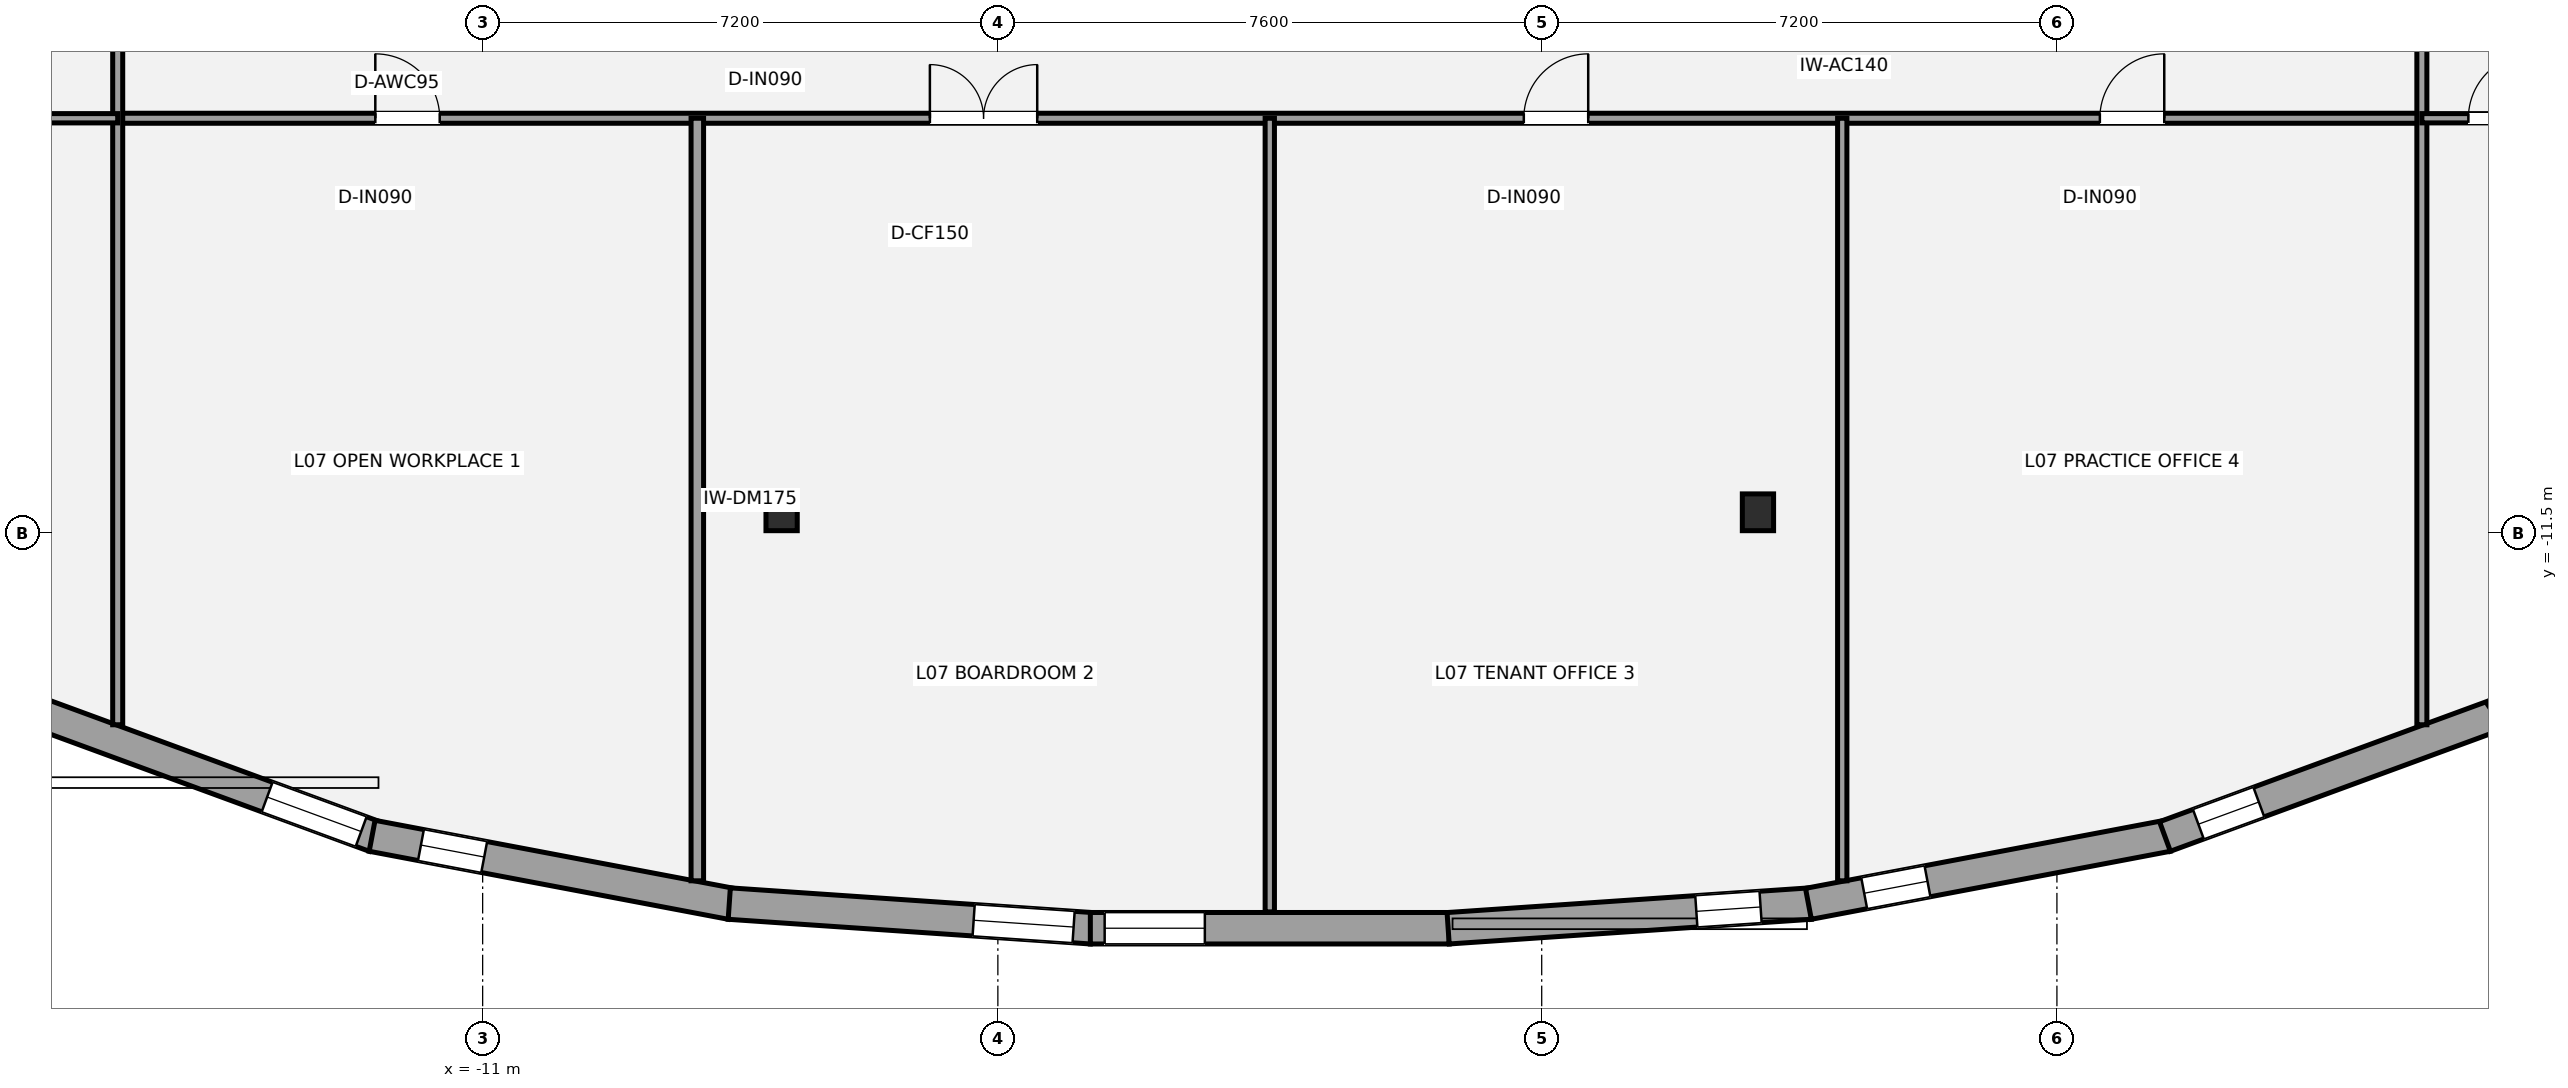
"""IFC4 building model, lengths in metres.
Left out: names, types, materials, properties, quantities, classifications, styles, units other than length and angle.
Written with IfcOpenShell. Run it as: python <this file> out.ifc"""

import sys

from ifc_helpers import new_model, si_unit, direction, frame, frame_2d, origin, origin_2d, place, context, subcontext, project, spatial, rectangle, i_section, extrude, element, fill, save


model = new_model("IFC4")
c1 = context("Model", 3, precision=1e-05, world=origin(), true_north=direction((0.0, 1.0)))
c2 = subcontext(c1, "Body", "Model", "MODEL_VIEW")
j1 = project(units=[si_unit("LENGTHUNIT", "METRE"), si_unit("PLANEANGLEUNIT", "RADIAN")], contexts=[c1])
p1 = place(None, origin())
s1 = spatial("IfcSite", under=j1, at=p1, CompositionType="ELEMENT")
p2 = place(p1, origin())
s2 = spatial("IfcBuilding", under=s1, at=p2, CompositionType="ELEMENT")
p3 = place(p2, frame((0.0, 0.0, 30.6)))
s3 = spatial("IfcBuildingStorey", under=s2, at=p3, CompositionType="ELEMENT", Elevation=30.6)
for number, where, z_axis, x_axis in (
    (1, (-6.822, -11.206, 0.0), (0.0, 0.0, 1.0), (1.0, 0.0, 0.0)),
    (2, (6.822, -11.206, 0.0), (0.0, 0.0, 1.0), (1.0, 0.0, 0.0)),
):
    element("IfcColumn", number, at=place(p3, frame(where, z_axis=z_axis, x_axis=x_axis)), inside=s3, PredefinedType="COLUMN", context=c2, shape_type="SweptSolid", body=[
        extrude(i_section(OverallWidth=0.437, OverallDepth=0.514, WebThickness=0.061, FlangeThickness=0.097, at=origin_2d()), origin(), (0.0, 0.0, 1.0), 3.6),
    ])
p4 = place(p3, frame((-17.125, -14.048, 0.0), z_axis=(0.0, 0.0, 1.0), x_axis=(-0.828051238664, 0.560652429003, 0.0)))
e3 = element("IfcWall", 3, at=p4, inside=s3, PredefinedType="STANDARD", context=c2, shape_type="SweptSolid", body=[
    extrude(rectangle(XDim=4.552, YDim=0.44, at=frame_2d((2.276, 0.0))), origin(), (0.0, 0.0, 1.0), 2.533),
])
p5 = place(p4, frame((3.156, 0.0, 0.58)))
e4 = element("IfcOpeningElement", 4, at=p5, cuts=e3, PredefinedType="OPENING", context=c2, shape_type="SweptSolid", body=[
    extrude(rectangle(XDim=0.9, YDim=1.35, at=frame_2d((0.45, 0.675))), frame((0.0, 0.23, 0.0), z_axis=(0.0, -1.0, 0.0), x_axis=(1.0, 0.0, 0.0)), (0.0, 0.0, 1.0), 0.46),
])
p6 = place(p3, frame((-12.51, -15.736, 0.0), z_axis=(0.0, 0.0, 1.0), x_axis=(-0.938710986641, 0.344705212552, 0.0)))
e5 = element("IfcWall", 5, at=p6, inside=s3, PredefinedType="STANDARD", context=c2, shape_type="SweptSolid", body=[
    extrude(rectangle(XDim=4.967, YDim=0.44, at=frame_2d((2.483, 0.0))), origin(), (0.0, 0.0, 1.0), 2.529),
])
p7 = place(p6, frame((0.2, 0.0, 0.45)))
e6 = element("IfcOpeningElement", 6, at=p7, cuts=e5, PredefinedType="OPENING", context=c2, shape_type="SweptSolid", body=[
    extrude(rectangle(XDim=1.4, YDim=1.55, at=frame_2d((0.7, 0.775))), frame((0.0, 0.23, 0.0), z_axis=(0.0, -1.0, 0.0), x_axis=(1.0, 0.0, 0.0)), (0.0, 0.0, 1.0), 0.46),
])
p8 = place(p3, frame((-7.528, -16.677, 0.0), z_axis=(0.0, 0.0, 1.0), x_axis=(-0.982516391845, 0.186176098776, 0.0)))
e7 = element("IfcWall", 7, at=p8, inside=s3, PredefinedType="STANDARD", context=c2, shape_type="SweptSolid", body=[
    extrude(rectangle(XDim=5.106, YDim=0.44, at=frame_2d((2.553, 0.0))), origin(), (0.0, 0.0, 1.0), 2.533),
])
p9 = place(p8, frame((3.512, 0.0, 0.58)))
e8 = element("IfcOpeningElement", 8, at=p9, cuts=e7, PredefinedType="OPENING", context=c2, shape_type="SweptSolid", body=[
    extrude(rectangle(XDim=0.9, YDim=1.35, at=frame_2d((0.45, 0.675))), frame((0.0, 0.23, 0.0), z_axis=(0.0, -1.0, 0.0), x_axis=(1.0, 0.0, 0.0)), (0.0, 0.0, 1.0), 0.46),
])
p10 = place(p3, frame((-2.492, -17.018, 0.0), z_axis=(0.0, 0.0, 1.0), x_axis=(-0.997688292846, 0.067956385408, 0.0)))
e9 = element("IfcWall", 9, at=p10, inside=s3, PredefinedType="STANDARD", context=c2, shape_type="SweptSolid", body=[
    extrude(rectangle(XDim=5.073, YDim=0.44, at=frame_2d((2.536, 0.0))), origin(), (0.0, 0.0, 1.0), 2.533),
])
p11 = place(p10, frame((0.25, 0.0, 0.45)))
e10 = element("IfcOpeningElement", 10, at=p11, cuts=e9, PredefinedType="OPENING", context=c2, shape_type="SweptSolid", body=[
    extrude(rectangle(XDim=1.4, YDim=1.55, at=frame_2d((0.7, 0.775))), frame((0.0, 0.23, 0.0), z_axis=(0.0, -1.0, 0.0), x_axis=(1.0, 0.0, 0.0)), (0.0, 0.0, 1.0), 0.46),
])
p12 = place(p3, frame((2.508, -17.018, 0.0), z_axis=(0.0, 0.0, 1.0), x_axis=(-1.0, 0.0, 0.0)))
e11 = element("IfcWall", 11, at=p12, inside=s3, PredefinedType="STANDARD", context=c2, shape_type="SweptSolid", body=[
    extrude(rectangle(XDim=5.015, YDim=0.44, at=frame_2d((2.508, 0.0))), origin(), (0.0, 0.0, 1.0), 2.533),
])
p13 = place(p12, frame((3.415, 0.0, 0.45)))
e12 = element("IfcOpeningElement", 12, at=p13, cuts=e11, PredefinedType="OPENING", context=c2, shape_type="SweptSolid", body=[
    extrude(rectangle(XDim=1.4, YDim=1.55, at=frame_2d((0.7, 0.775))), frame((0.0, 0.23, 0.0), z_axis=(0.0, -1.0, 0.0), x_axis=(1.0, 0.0, 0.0)), (0.0, 0.0, 1.0), 0.46),
])
p14 = place(p3, frame((7.553, -16.674, 0.0), z_axis=(0.0, 0.0, 1.0), x_axis=(-0.997688292846, -0.067956385408, 0.0)))
e13 = element("IfcWall", 13, at=p14, inside=s3, PredefinedType="STANDARD", context=c2, shape_type="SweptSolid", body=[
    extrude(rectangle(XDim=5.073, YDim=0.44, at=frame_2d((2.536, 0.0))), origin(), (0.0, 0.0, 1.0), 2.533),
])
p15 = place(p14, frame((0.696, 0.0, 0.58)))
e14 = element("IfcOpeningElement", 14, at=p15, cuts=e13, PredefinedType="OPENING", context=c2, shape_type="SweptSolid", body=[
    extrude(rectangle(XDim=0.9, YDim=1.35, at=frame_2d((0.45, 0.675))), frame((0.0, 0.23, 0.0), z_axis=(0.0, -1.0, 0.0), x_axis=(1.0, 0.0, 0.0)), (0.0, 0.0, 1.0), 0.46),
])
p16 = place(p3, frame((12.545, -15.726, 0.0), z_axis=(0.0, 0.0, 1.0), x_axis=(-0.982516391845, -0.186176098776, 0.0)))
e15 = element("IfcWall", 15, at=p16, inside=s3, PredefinedType="STANDARD", context=c2, shape_type="SweptSolid", body=[
    extrude(rectangle(XDim=5.106, YDim=0.44, at=frame_2d((2.553, 0.0))), origin(), (0.0, 0.0, 1.0), 2.533),
])
p17 = place(p16, frame((3.413, 0.0, 0.58)))
e16 = element("IfcOpeningElement", 16, at=p17, cuts=e15, PredefinedType="OPENING", context=c2, shape_type="SweptSolid", body=[
    extrude(rectangle(XDim=0.9, YDim=1.35, at=frame_2d((0.45, 0.675))), frame((0.0, 0.23, 0.0), z_axis=(0.0, -1.0, 0.0), x_axis=(1.0, 0.0, 0.0)), (0.0, 0.0, 1.0), 0.46),
])
p18 = place(p3, frame((17.173, -14.024, 0.0), z_axis=(0.0, 0.0, 1.0), x_axis=(-0.938710986641, -0.344705212552, 0.0)))
e17 = element("IfcWall", 17, at=p18, inside=s3, PredefinedType="STANDARD", context=c2, shape_type="SweptSolid", body=[
    extrude(rectangle(XDim=4.967, YDim=0.44, at=frame_2d((2.483, 0.0))), origin(), (0.0, 0.0, 1.0), 2.529),
])
p19 = place(p18, frame((3.57, 0.0, 0.58)))
e18 = element("IfcOpeningElement", 18, at=p19, cuts=e17, PredefinedType="OPENING", context=c2, shape_type="SweptSolid", body=[
    extrude(rectangle(XDim=0.9, YDim=1.35, at=frame_2d((0.45, 0.675))), frame((0.0, 0.23, 0.0), z_axis=(0.0, -1.0, 0.0), x_axis=(1.0, 0.0, 0.0)), (0.0, 0.0, 1.0), 0.46),
])
p20 = place(p3, frame((20.894, -11.496, 0.0), z_axis=(0.0, 0.0, 1.0), x_axis=(-0.828051238664, -0.560652429003, 0.0)))
e19 = element("IfcWall", 19, at=p20, inside=s3, PredefinedType="STANDARD", context=c2, shape_type="SweptSolid", body=[
    extrude(rectangle(XDim=4.552, YDim=0.44, at=frame_2d((2.276, 0.0))), origin(), (0.0, 0.0, 1.0), 2.533),
])
p21 = place(p20, frame((3.107, 0.0, 0.58)))
e20 = element("IfcOpeningElement", 20, at=p21, cuts=e19, PredefinedType="OPENING", context=c2, shape_type="SweptSolid", body=[
    extrude(rectangle(XDim=0.9, YDim=1.35, at=frame_2d((0.45, 0.675))), frame((0.0, 0.23, 0.0), z_axis=(0.0, -1.0, 0.0), x_axis=(1.0, 0.0, 0.0)), (0.0, 0.0, 1.0), 0.46),
])
p22 = place(p3, frame((-16.1, -5.7, 0.0), z_axis=(0.0, 0.0, 1.0), x_axis=(1.0, 0.0, 0.0)))
e21 = element("IfcWall", 21, at=p22, inside=s3, PredefinedType="PARTITIONING", context=c2, shape_type="SweptSolid", body=[
    extrude(rectangle(XDim=32.2, YDim=0.14, at=frame_2d((16.1, 0.0))), origin(), (0.0, 0.0, 1.0), 2.853),
])
p23 = place(p22, frame((3.6, 0.0, 0.0)))
e22 = element("IfcOpeningElement", 22, at=p23, cuts=e21, PredefinedType="OPENING", context=c2, shape_type="SweptSolid", body=[
    extrude(rectangle(XDim=0.9, YDim=2.1, at=frame_2d((0.45, 1.05))), frame((0.0, 0.08, 0.0), z_axis=(0.0, -1.0, 0.0), x_axis=(1.0, 0.0, 0.0)), (0.0, 0.0, 1.0), 0.16),
])
p24 = place(p22, frame((11.35, 0.0, 0.0)))
e23 = element("IfcOpeningElement", 23, at=p24, cuts=e21, PredefinedType="OPENING", context=c2, shape_type="SweptSolid", body=[
    extrude(rectangle(XDim=1.5, YDim=2.15, at=frame_2d((0.75, 1.075))), frame((0.0, 0.08, 0.0), z_axis=(0.0, -1.0, 0.0), x_axis=(1.0, 0.0, 0.0)), (0.0, 0.0, 1.0), 0.16),
])
p25 = place(p22, frame((19.65, 0.0, 0.0)))
e24 = element("IfcOpeningElement", 24, at=p25, cuts=e21, PredefinedType="OPENING", context=c2, shape_type="SweptSolid", body=[
    extrude(rectangle(XDim=0.9, YDim=2.1, at=frame_2d((0.45, 1.05))), frame((0.0, 0.08, 0.0), z_axis=(0.0, -1.0, 0.0), x_axis=(1.0, 0.0, 0.0)), (0.0, 0.0, 1.0), 0.16),
])
p26 = place(p22, frame((27.7, 0.0, 0.0)))
e25 = element("IfcOpeningElement", 25, at=p26, cuts=e21, PredefinedType="OPENING", context=c2, shape_type="SweptSolid", body=[
    extrude(rectangle(XDim=0.9, YDim=2.1, at=frame_2d((0.45, 1.05))), frame((0.0, 0.08, 0.0), z_axis=(0.0, -1.0, 0.0), x_axis=(1.0, 0.0, 0.0)), (0.0, 0.0, 1.0), 0.16),
])
p27 = place(p3, frame((-16.1, -14.175, 0.0), z_axis=(0.0, 0.0, 1.0), x_axis=(0.0, 1.0, 0.0)))
e26 = element("IfcWall", 26, at=p27, inside=s3, PredefinedType="PARTITIONING", context=c2, shape_type="SweptSolid", body=[
    extrude(rectangle(XDim=20.025, YDim=0.14, at=frame_2d((10.012, 0.0))), origin(), (0.0, 0.0, 1.0), 2.841),
])
p28 = place(p27, frame((10.375, 0.0, 0.0)))
e27 = element("IfcOpeningElement", 27, at=p28, cuts=e26, PredefinedType="OPENING", context=c2, shape_type="SweptSolid", body=[
    extrude(rectangle(XDim=0.9, YDim=2.1, at=frame_2d((0.45, 1.05))), frame((0.0, 0.08, 0.0), z_axis=(0.0, -1.0, 0.0), x_axis=(1.0, 0.0, 0.0)), (0.0, 0.0, 1.0), 0.16),
])
p29 = place(p27, frame((16.15, 0.0, 0.0)))
e28 = element("IfcOpeningElement", 28, at=p29, cuts=e26, PredefinedType="OPENING", context=c2, shape_type="SweptSolid", body=[
    extrude(rectangle(XDim=0.9, YDim=2.1, at=frame_2d((0.45, 1.05))), frame((0.0, 0.08, 0.0), z_axis=(0.0, -1.0, 0.0), x_axis=(1.0, 0.0, 0.0)), (0.0, 0.0, 1.0), 0.16),
])
p30 = place(p3, frame((16.1, -14.175, 0.0), z_axis=(0.0, 0.0, 1.0), x_axis=(0.0, 1.0, 0.0)))
e29 = element("IfcWall", 29, at=p30, inside=s3, PredefinedType="PARTITIONING", context=c2, shape_type="SweptSolid", body=[
    extrude(rectangle(XDim=20.025, YDim=0.14, at=frame_2d((10.012, 0.0))), origin(), (0.0, 0.0, 1.0), 2.841),
])
p31 = place(p30, frame((10.375, 0.0, 0.0)))
e30 = element("IfcOpeningElement", 30, at=p31, cuts=e29, PredefinedType="OPENING", context=c2, shape_type="SweptSolid", body=[
    extrude(rectangle(XDim=0.9, YDim=2.1, at=frame_2d((0.45, 1.05))), frame((0.0, 0.08, 0.0), z_axis=(0.0, -1.0, 0.0), x_axis=(1.0, 0.0, 0.0)), (0.0, 0.0, 1.0), 0.16),
])
p32 = place(p30, frame((16.15, 0.0, 0.0)))
e31 = element("IfcOpeningElement", 31, at=p32, cuts=e29, PredefinedType="OPENING", context=c2, shape_type="SweptSolid", body=[
    extrude(rectangle(XDim=0.9, YDim=2.1, at=frame_2d((0.45, 1.05))), frame((0.0, 0.08, 0.0), z_axis=(0.0, -1.0, 0.0), x_axis=(1.0, 0.0, 0.0)), (0.0, 0.0, 1.0), 0.16),
])
p33 = place(p3, frame((-8.0, -16.355, 0.0), z_axis=(0.0, 0.0, 1.0), x_axis=(0.0, 1.0, 0.0)))
e32 = element("IfcWall", 32, at=p33, inside=s3, PredefinedType="PARTITIONING", context=c2, shape_type="SweptSolid", body=[
    extrude(rectangle(XDim=10.655, YDim=0.175, at=frame_2d((5.328, 0.0))), origin(), (0.0, 0.0, 1.0), 2.853),
])
p34 = place(p3, frame((0.0, -16.79, 0.0), z_axis=(0.0, 0.0, 1.0), x_axis=(0.0, 1.0, 0.0)))
e33 = element("IfcWall", 33, at=p34, inside=s3, PredefinedType="PARTITIONING", context=c2, shape_type="SweptSolid", body=[
    extrude(rectangle(XDim=11.09, YDim=0.13, at=frame_2d((5.545, 0.0))), origin(), (0.0, 0.0, 1.0), 2.853),
])
p35 = place(p3, frame((8.0, -16.355, 0.0), z_axis=(0.0, 0.0, 1.0), x_axis=(0.0, 1.0, 0.0)))
e34 = element("IfcWall", 34, at=p35, inside=s3, PredefinedType="PARTITIONING", context=c2, shape_type="SweptSolid", body=[
    extrude(rectangle(XDim=10.655, YDim=0.13, at=frame_2d((5.328, 0.0))), origin(), (0.0, 0.0, 1.0), 2.853),
])
p36 = place(p3, frame((-24.227, -5.7, 0.0), z_axis=(0.0, 0.0, 1.0), x_axis=(1.0, 0.0, 0.0)))
e35 = element("IfcWall", 35, at=p36, inside=s3, PredefinedType="PARTITIONING", context=c2, shape_type="SweptSolid", body=[
    extrude(rectangle(XDim=8.127, YDim=0.13, at=frame_2d((4.063, 0.0))), origin(), (0.0, 0.0, 1.0), 2.779),
])
p37 = place(p36, frame((0.63, 0.0, 0.0)))
e36 = element("IfcOpeningElement", 36, at=p37, cuts=e35, PredefinedType="OPENING", context=c2, shape_type="SweptSolid", body=[
    extrude(rectangle(XDim=0.9, YDim=2.1, at=frame_2d((0.45, 1.05))), frame((0.0, 0.075, 0.0), z_axis=(0.0, -1.0, 0.0), x_axis=(1.0, 0.0, 0.0)), (0.0, 0.0, 1.0), 0.15),
])
p38 = place(p3, frame((16.1, -5.7, 0.0), z_axis=(0.0, 0.0, 1.0), x_axis=(1.0, 0.0, 0.0)))
e37 = element("IfcWall", 37, at=p38, inside=s3, PredefinedType="PARTITIONING", context=c2, shape_type="SweptSolid", body=[
    extrude(rectangle(XDim=8.127, YDim=0.13, at=frame_2d((4.063, 0.0))), origin(), (0.0, 0.0, 1.0), 2.779),
])
p39 = place(p38, frame((0.65, 0.0, 0.0)))
e38 = element("IfcOpeningElement", 38, at=p39, cuts=e37, PredefinedType="OPENING", context=c2, shape_type="SweptSolid", body=[
    extrude(rectangle(XDim=0.9, YDim=2.1, at=frame_2d((0.45, 1.05))), frame((0.0, 0.075, 0.0), z_axis=(0.0, -1.0, 0.0), x_axis=(1.0, 0.0, 0.0)), (0.0, 0.0, 1.0), 0.15),
])
p40 = place(p7, origin())
e39 = element("IfcWindow", 39, at=p40, inside=s3, PartitioningType="SINGLE_PANEL", PredefinedType="WINDOW", context=c2, shape_type="SweptSolid", body=[
    extrude(rectangle(XDim=1.4, YDim=1.55, at=frame_2d((0.7, 0.775))), frame((0.0, -0.01, 0.0), z_axis=(0.0, -1.0, 0.0), x_axis=(1.0, 0.0, 0.0)), (0.0, 0.0, 1.0), 0.06),
])
fill(e6, e39)
p41 = place(p9, origin())
e40 = element("IfcWindow", 40, at=p41, inside=s3, PartitioningType="SINGLE_PANEL", PredefinedType="WINDOW", context=c2, shape_type="SweptSolid", body=[
    extrude(rectangle(XDim=0.9, YDim=1.35, at=frame_2d((0.45, 0.675))), frame((0.0, -0.01, 0.0), z_axis=(0.0, -1.0, 0.0), x_axis=(1.0, 0.0, 0.0)), (0.0, 0.0, 1.0), 0.06),
])
fill(e8, e40)
p42 = place(p11, origin())
e41 = element("IfcWindow", 41, at=p42, inside=s3, PartitioningType="SINGLE_PANEL", PredefinedType="WINDOW", context=c2, shape_type="SweptSolid", body=[
    extrude(rectangle(XDim=1.4, YDim=1.55, at=frame_2d((0.7, 0.775))), frame((0.0, -0.01, 0.0), z_axis=(0.0, -1.0, 0.0), x_axis=(1.0, 0.0, 0.0)), (0.0, 0.0, 1.0), 0.06),
])
fill(e10, e41)
p43 = place(p13, origin())
e42 = element("IfcWindow", 42, at=p43, inside=s3, PartitioningType="SINGLE_PANEL", PredefinedType="WINDOW", context=c2, shape_type="SweptSolid", body=[
    extrude(rectangle(XDim=1.4, YDim=1.55, at=frame_2d((0.7, 0.775))), frame((0.0, -0.01, 0.0), z_axis=(0.0, -1.0, 0.0), x_axis=(1.0, 0.0, 0.0)), (0.0, 0.0, 1.0), 0.06),
])
fill(e12, e42)
p44 = place(p15, origin())
e43 = element("IfcWindow", 43, at=p44, inside=s3, PartitioningType="SINGLE_PANEL", PredefinedType="WINDOW", context=c2, shape_type="SweptSolid", body=[
    extrude(rectangle(XDim=0.9, YDim=1.35, at=frame_2d((0.45, 0.675))), frame((0.0, -0.01, 0.0), z_axis=(0.0, -1.0, 0.0), x_axis=(1.0, 0.0, 0.0)), (0.0, 0.0, 1.0), 0.06),
])
fill(e14, e43)
p45 = place(p17, origin())
e44 = element("IfcWindow", 44, at=p45, inside=s3, PartitioningType="SINGLE_PANEL", PredefinedType="WINDOW", context=c2, shape_type="SweptSolid", body=[
    extrude(rectangle(XDim=0.9, YDim=1.35, at=frame_2d((0.45, 0.675))), frame((0.0, -0.01, 0.0), z_axis=(0.0, -1.0, 0.0), x_axis=(1.0, 0.0, 0.0)), (0.0, 0.0, 1.0), 0.06),
])
fill(e16, e44)
p46 = place(p19, origin())
e45 = element("IfcWindow", 45, at=p46, inside=s3, PartitioningType="SINGLE_PANEL", PredefinedType="WINDOW", context=c2, shape_type="SweptSolid", body=[
    extrude(rectangle(XDim=0.9, YDim=1.35, at=frame_2d((0.45, 0.675))), frame((0.0, -0.01, 0.0), z_axis=(0.0, -1.0, 0.0), x_axis=(1.0, 0.0, 0.0)), (0.0, 0.0, 1.0), 0.06),
])
fill(e18, e45)
p47 = place(p23, origin())
e46 = element("IfcDoor", 46, at=p47, inside=s3, OperationType="SINGLE_SWING_LEFT", PredefinedType="DOOR", context=c2, shape_type="SweptSolid", body=[
    extrude(rectangle(XDim=0.9, YDim=2.1, at=frame_2d((0.45, 1.05))), frame((0.0, 0.025, 0.0), z_axis=(0.0, -1.0, 0.0), x_axis=(1.0, 0.0, 0.0)), (0.0, 0.0, 1.0), 0.05),
])
fill(e22, e46)
p48 = place(p24, origin())
e47 = element("IfcDoor", 47, at=p48, inside=s3, OperationType="DOUBLE_DOOR_SINGLE_SWING", PredefinedType="DOOR", context=c2, shape_type="SweptSolid", body=[
    extrude(rectangle(XDim=1.5, YDim=2.15, at=frame_2d((0.75, 1.075))), frame((0.0, 0.025, 0.0), z_axis=(0.0, -1.0, 0.0), x_axis=(1.0, 0.0, 0.0)), (0.0, 0.0, 1.0), 0.05),
])
fill(e23, e47)
p49 = place(p25, origin())
e48 = element("IfcDoor", 48, at=p49, inside=s3, OperationType="SINGLE_SWING_RIGHT", PredefinedType="DOOR", context=c2, shape_type="SweptSolid", body=[
    extrude(rectangle(XDim=0.9, YDim=2.1, at=frame_2d((0.45, 1.05))), frame((0.0, 0.025, 0.0), z_axis=(0.0, -1.0, 0.0), x_axis=(1.0, 0.0, 0.0)), (0.0, 0.0, 1.0), 0.05),
])
fill(e24, e48)
p50 = place(p26, origin())
e49 = element("IfcDoor", 49, at=p50, inside=s3, OperationType="SINGLE_SWING_RIGHT", PredefinedType="DOOR", context=c2, shape_type="SweptSolid", body=[
    extrude(rectangle(XDim=0.9, YDim=2.1, at=frame_2d((0.45, 1.05))), frame((0.0, 0.025, 0.0), z_axis=(0.0, -1.0, 0.0), x_axis=(1.0, 0.0, 0.0)), (0.0, 0.0, 1.0), 0.05),
])
fill(e25, e49)
p51 = place(p39, origin())
e50 = element("IfcDoor", 50, at=p51, inside=s3, OperationType="SINGLE_SWING_RIGHT", PredefinedType="DOOR", context=c2, shape_type="SweptSolid", body=[
    extrude(rectangle(XDim=0.9, YDim=2.1, at=frame_2d((0.45, 1.05))), frame((0.0, 0.025, 0.0), z_axis=(0.0, -1.0, 0.0), x_axis=(1.0, 0.0, 0.0)), (0.0, 0.0, 1.0), 0.05),
])
fill(e38, e50)
save(model, sys.argv[1])
